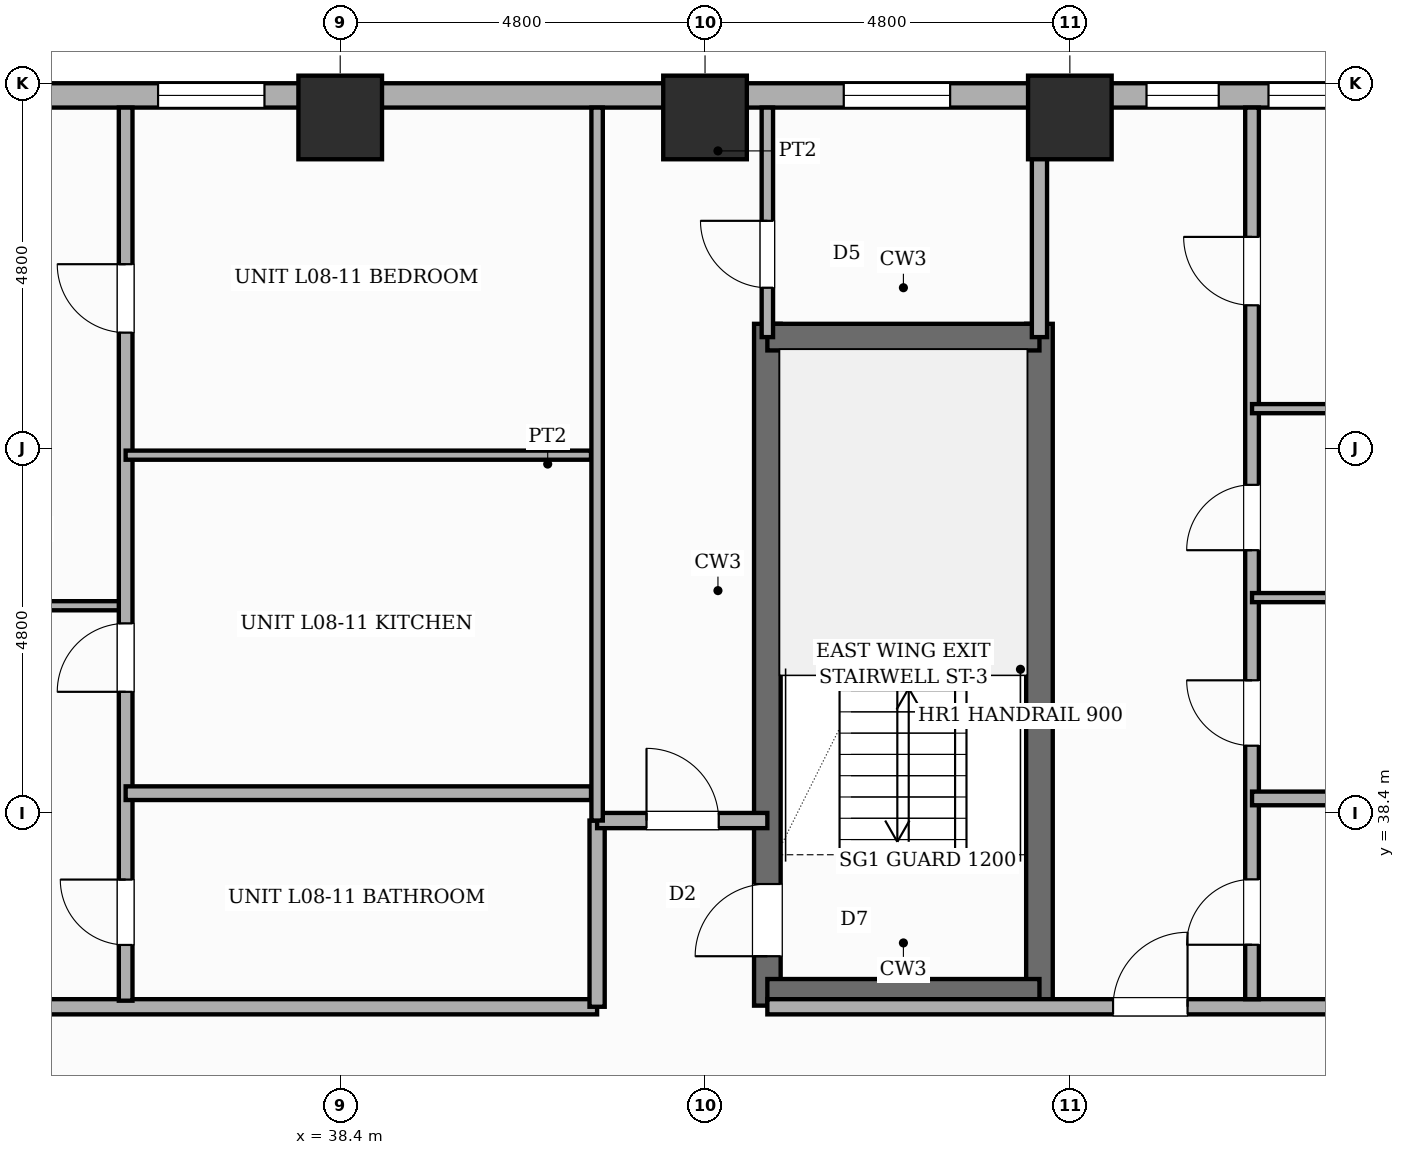
"""IFC4 building model, lengths in metres.
Left out: names, types, materials, properties, quantities, classifications, styles, units other than length and angle.
Written with IfcOpenShell. Run it as: python <this file> out.ifc"""

import sys

from ifc_helpers import new_model, si_unit, direction, frame, frame_2d, origin, origin_2d, place, context, subcontext, project, spatial, rectangle, extrude, element, fill, save


model = new_model("IFC4")
c1 = context("Model", 3, precision=1e-05, world=origin(), true_north=direction((0.0, 1.0)))
c2 = subcontext(c1, "Body", "Model", "MODEL_VIEW")
j1 = project(units=[si_unit("LENGTHUNIT", "METRE"), si_unit("PLANEANGLEUNIT", "RADIAN")], contexts=[c1])
p1 = place(None, origin())
s1 = spatial("IfcSite", under=j1, at=p1, CompositionType="ELEMENT")
p2 = place(p1, origin())
s2 = spatial("IfcBuilding", under=s1, at=p2, CompositionType="ELEMENT")
p3 = place(p2, frame((0.0, 0.0, 35.8)))
s3 = spatial("IfcBuildingStorey", under=s2, at=p3, CompositionType="ELEMENT", Elevation=35.8)
p4 = place(p3, frame((44.02, 35.865, 0.0), z_axis=(0.0, 0.0, 1.0), x_axis=(0.0, 1.0, 0.0)))
e1 = element("IfcWall", 1, at=p4, inside=s3, PredefinedType="SHEAR", context=c2, shape_type="SweptSolid", body=[
    extrude(rectangle(XDim=8.97, YDim=0.35, at=frame_2d((4.485, 0.0))), origin(), (0.0, 0.0, 1.0), 3.6),
])
p5 = place(p4, frame((0.65, 0.0, 0.0)))
e2 = element("IfcOpeningElement", 2, at=p5, cuts=e1, PredefinedType="OPENING", context=c2, shape_type="SweptSolid", body=[
    extrude(rectangle(XDim=0.95, YDim=2.1, at=frame_2d((0.475, 1.05))), frame((0.0, 0.185, 0.0), z_axis=(0.0, -1.0, 0.0), x_axis=(1.0, 0.0, 0.0)), (0.0, 0.0, 1.0), 0.37),
])
p6 = place(p3, frame((47.6, 35.865, 0.0), z_axis=(0.0, 0.0, 1.0), x_axis=(0.0, 1.0, 0.0)))
e3 = element("IfcWall", 3, at=p6, inside=s3, PredefinedType="SHEAR", context=c2, shape_type="SweptSolid", body=[
    extrude(rectangle(XDim=8.97, YDim=0.35, at=frame_2d((4.485, 0.0))), origin(), (0.0, 0.0, 1.0), 3.6),
])
for number, where, z_axis, x_axis in (
    (4, (44.02, 36.04, 0.0), (0.0, 0.0, 1.0), (1.0, 0.0, 0.0)),
    (5, (44.02, 44.66, 0.0), (0.0, 0.0, 1.0), (1.0, 0.0, 0.0)),
):
    element("IfcWall", number, at=place(p3, frame(where, z_axis=z_axis, x_axis=x_axis)), inside=s3, PredefinedType="SHEAR", context=c2, shape_type="SweptSolid", body=[
        extrude(rectangle(XDim=3.58, YDim=0.35, at=frame_2d((1.79, 0.0))), origin(), (0.0, 0.0, 1.0), 3.6),
    ])
for number, where, z_axis, x_axis in (
    (6, (38.4, 47.55, 0.0), (0.0, 0.0, 1.0), (1.0, 0.0, 0.0)),
    (7, (43.2, 47.55, 0.0), (0.0, 0.0, 1.0), (1.0, 0.0, 0.0)),
    (8, (48.0, 47.55, 0.0), (0.0, 0.0, 1.0), (1.0, 0.0, 0.0)),
):
    element("IfcColumn", number, at=place(p3, frame(where, z_axis=z_axis, x_axis=x_axis)), inside=s3, PredefinedType="COLUMN", context=c2, shape_type="SweptSolid", body=[
        extrude(rectangle(XDim=1.1, YDim=1.1, at=origin_2d()), origin(), (0.0, 0.0, 1.0), 3.6),
    ])
p7 = place(p3, frame((7.2, 47.84, 0.0), z_axis=(0.0, 0.0, 1.0), x_axis=(1.0, 0.0, 0.0)))
e9 = element("IfcWall", 9, at=p7, inside=s3, PredefinedType="STANDARD", context=c2, shape_type="SweptSolid", body=[
    extrude(rectangle(XDim=48.0, YDim=0.32, at=frame_2d((24.0, 0.0))), origin(), (0.0, 0.0, 1.0), 2.53),
])
p8 = place(p7, frame((28.803, 0.0, 0.65)))
e10 = element("IfcOpeningElement", 10, at=p8, cuts=e9, PredefinedType="OPENING", context=c2, shape_type="SweptSolid", body=[
    extrude(rectangle(XDim=1.4, YDim=1.1, at=frame_2d((0.7, 0.55))), frame((0.0, 0.17, 0.0), z_axis=(0.0, -1.0, 0.0), x_axis=(1.0, 0.0, 0.0)), (0.0, 0.0, 1.0), 0.34),
])
p9 = place(p7, frame((43.414, 0.0, 0.45)))
e11 = element("IfcOpeningElement", 11, at=p9, cuts=e9, PredefinedType="OPENING", context=c2, shape_type="SweptSolid", body=[
    extrude(rectangle(XDim=0.95, YDim=1.8, at=frame_2d((0.475, 0.9))), frame((0.0, 0.17, 0.0), z_axis=(0.0, -1.0, 0.0), x_axis=(1.0, 0.0, 0.0)), (0.0, 0.0, 1.0), 0.34),
])
p10 = place(p7, frame((18.74, 0.0, 0.45)))
e12 = element("IfcOpeningElement", 12, at=p10, cuts=e9, PredefinedType="OPENING", context=c2, shape_type="SweptSolid", body=[
    extrude(rectangle(XDim=0.95, YDim=1.8, at=frame_2d((0.475, 0.9))), frame((0.0, 0.17, 0.0), z_axis=(0.0, -1.0, 0.0), x_axis=(1.0, 0.0, 0.0)), (0.0, 0.0, 1.0), 0.34),
])
p11 = place(p7, frame((37.825, 0.0, 0.65)))
e13 = element("IfcOpeningElement", 13, at=p11, cuts=e9, PredefinedType="OPENING", context=c2, shape_type="SweptSolid", body=[
    extrude(rectangle(XDim=1.4, YDim=1.1, at=frame_2d((0.7, 0.55))), frame((0.0, 0.17, 0.0), z_axis=(0.0, -1.0, 0.0), x_axis=(1.0, 0.0, 0.0)), (0.0, 0.0, 1.0), 0.34),
])
p12 = place(p7, frame((0.47, 0.0, 0.45)))
e14 = element("IfcOpeningElement", 14, at=p12, cuts=e9, PredefinedType="OPENING", context=c2, shape_type="SweptSolid", body=[
    extrude(rectangle(XDim=0.95, YDim=1.8, at=frame_2d((0.475, 0.9))), frame((0.0, 0.17, 0.0), z_axis=(0.0, -1.0, 0.0), x_axis=(1.0, 0.0, 0.0)), (0.0, 0.0, 1.0), 0.34),
])
p13 = place(p7, frame((5.265, 0.0, 0.45)))
e15 = element("IfcOpeningElement", 15, at=p13, cuts=e9, PredefinedType="OPENING", context=c2, shape_type="SweptSolid", body=[
    extrude(rectangle(XDim=0.95, YDim=1.8, at=frame_2d((0.475, 0.9))), frame((0.0, 0.17, 0.0), z_axis=(0.0, -1.0, 0.0), x_axis=(1.0, 0.0, 0.0)), (0.0, 0.0, 1.0), 0.34),
])
p14 = place(p7, frame((23.43, 0.0, 0.65)))
e16 = element("IfcOpeningElement", 16, at=p14, cuts=e9, PredefinedType="OPENING", context=c2, shape_type="SweptSolid", body=[
    extrude(rectangle(XDim=1.4, YDim=1.1, at=frame_2d((0.7, 0.55))), frame((0.0, 0.17, 0.0), z_axis=(0.0, -1.0, 0.0), x_axis=(1.0, 0.0, 0.0)), (0.0, 0.0, 1.0), 0.34),
])
p15 = place(p7, frame((41.809, 0.0, 0.45)))
e17 = element("IfcOpeningElement", 17, at=p15, cuts=e9, PredefinedType="OPENING", context=c2, shape_type="SweptSolid", body=[
    extrude(rectangle(XDim=0.95, YDim=1.8, at=frame_2d((0.475, 0.9))), frame((0.0, 0.17, 0.0), z_axis=(0.0, -1.0, 0.0), x_axis=(1.0, 0.0, 0.0)), (0.0, 0.0, 1.0), 0.34),
])
p16 = place(p3, frame((27.35, 35.85, 0.0), z_axis=(0.0, 0.0, 1.0), x_axis=(1.0, 0.0, 0.0)))
e18 = element("IfcWall", 18, at=p16, inside=s3, PredefinedType="PARTITIONING", context=c2, shape_type="SweptSolid", body=[
    extrude(rectangle(XDim=14.43, YDim=0.2, at=frame_2d((7.215, 0.0))), origin(), (0.0, 0.0, 1.0), 3.35),
])
p17 = place(p16, frame((4.803, 0.0, 0.0)))
e19 = element("IfcOpeningElement", 19, at=p17, cuts=e18, PredefinedType="OPENING", context=c2, shape_type="SweptSolid", body=[
    extrude(rectangle(XDim=0.98, YDim=2.18, at=frame_2d((0.49, 1.09))), frame((0.0, 0.11, 0.0), z_axis=(0.0, -1.0, 0.0), x_axis=(1.0, 0.0, 0.0)), (0.0, 0.0, 1.0), 0.22),
])
p18 = place(p3, frame((44.02, 35.85, 0.0), z_axis=(0.0, 0.0, 1.0), x_axis=(1.0, 0.0, 0.0)))
e20 = element("IfcWall", 20, at=p18, inside=s3, PredefinedType="PARTITIONING", context=c2, shape_type="SweptSolid", body=[
    extrude(rectangle(XDim=13.26, YDim=0.2, at=frame_2d((6.63, 0.0))), origin(), (0.0, 0.0, 1.0), 3.35),
])
p19 = place(p18, frame((4.549, 0.0, 0.0)))
e21 = element("IfcOpeningElement", 21, at=p19, cuts=e20, PredefinedType="OPENING", context=c2, shape_type="SweptSolid", body=[
    extrude(rectangle(XDim=0.98, YDim=2.18, at=frame_2d((0.49, 1.09))), frame((0.0, 0.11, 0.0), z_axis=(0.0, -1.0, 0.0), x_axis=(1.0, 0.0, 0.0)), (0.0, 0.0, 1.0), 0.22),
])
p20 = place(p3, frame((41.78, 35.85, 0.0), z_axis=(0.0, 0.0, 1.0), x_axis=(0.0, 1.0, 0.0)))
e22 = element("IfcWall", 22, at=p20, inside=s3, PredefinedType="PARTITIONING", context=c2, shape_type="SweptSolid", body=[
    extrude(rectangle(XDim=2.45, YDim=0.2, at=frame_2d((1.225, 0.0))), origin(), (0.0, 0.0, 1.0), 3.35),
])
p21 = place(p3, frame((41.78, 38.3, 0.0), z_axis=(0.0, 0.0, 1.0), x_axis=(1.0, 0.0, 0.0)))
e23 = element("IfcWall", 23, at=p21, inside=s3, PredefinedType="PARTITIONING", context=c2, shape_type="SweptSolid", body=[
    extrude(rectangle(XDim=2.24, YDim=0.2, at=frame_2d((1.12, 0.0))), origin(), (0.0, 0.0, 1.0), 3.35),
])
p22 = place(p21, frame((0.65, 0.0, 0.0)))
e24 = element("IfcOpeningElement", 24, at=p22, cuts=e23, PredefinedType="OPENING", context=c2, shape_type="SweptSolid", body=[
    extrude(rectangle(XDim=0.95, YDim=2.15, at=frame_2d((0.475, 1.075))), frame((0.0, 0.11, 0.0), z_axis=(0.0, -1.0, 0.0), x_axis=(1.0, 0.0, 0.0)), (0.0, 0.0, 1.0), 0.22),
])
p23 = place(p3, frame((29.63, 41.126, 0.0), z_axis=(0.0, 0.0, 1.0), x_axis=(1.0, 0.0, 0.0)))
e25 = element("IfcWall", 25, at=p23, inside=s3, PredefinedType="PARTITIONING", context=c2, shape_type="SweptSolid", body=[
    extrude(rectangle(XDim=5.947, YDim=0.12, at=frame_2d((2.974, 0.0))), origin(), (0.0, 0.0, 1.0), 3.35),
])
p24 = place(p23, frame((2.235, 0.0, 0.0)))
e26 = element("IfcOpeningElement", 26, at=p24, cuts=e25, PredefinedType="OPENING", context=c2, shape_type="SweptSolid", body=[
    extrude(rectangle(XDim=0.9, YDim=2.15, at=frame_2d((0.45, 1.075))), frame((0.0, 0.07, 0.0), z_axis=(0.0, -1.0, 0.0), x_axis=(1.0, 0.0, 0.0)), (0.0, 0.0, 1.0), 0.14),
])
p25 = place(p3, frame((35.577, 35.93, 0.0), z_axis=(0.0, 0.0, 1.0), x_axis=(0.0, 1.0, 0.0)))
e27 = element("IfcWall", 27, at=p25, inside=s3, PredefinedType="PLUMBINGWALL", context=c2, shape_type="SweptSolid", body=[
    extrude(rectangle(XDim=11.75, YDim=0.18, at=frame_2d((5.875, 0.0))), origin(), (0.0, 0.0, 1.0), 3.35),
])
p26 = place(p25, frame((0.733, 0.0, 0.0)))
e28 = element("IfcOpeningElement", 28, at=p26, cuts=e27, PredefinedType="OPENING", context=c2, shape_type="SweptSolid", body=[
    extrude(rectangle(XDim=0.86, YDim=2.1, at=frame_2d((0.43, 1.05))), frame((0.0, 0.1, 0.0), z_axis=(0.0, -1.0, 0.0), x_axis=(1.0, 0.0, 0.0)), (0.0, 0.0, 1.0), 0.2),
])
p27 = place(p25, frame((4.064, 0.0, 0.0)))
e29 = element("IfcOpeningElement", 29, at=p27, cuts=e27, PredefinedType="OPENING", context=c2, shape_type="SweptSolid", body=[
    extrude(rectangle(XDim=0.9, YDim=2.15, at=frame_2d((0.45, 1.075))), frame((0.0, 0.1, 0.0), z_axis=(0.0, -1.0, 0.0), x_axis=(1.0, 0.0, 0.0)), (0.0, 0.0, 1.0), 0.2),
])
p28 = place(p25, frame((8.789, 0.0, 0.0)))
e30 = element("IfcOpeningElement", 30, at=p28, cuts=e27, PredefinedType="OPENING", context=c2, shape_type="SweptSolid", body=[
    extrude(rectangle(XDim=0.9, YDim=2.15, at=frame_2d((0.45, 1.075))), frame((0.0, 0.1, 0.0), z_axis=(0.0, -1.0, 0.0), x_axis=(1.0, 0.0, 0.0)), (0.0, 0.0, 1.0), 0.2),
])
p29 = place(p3, frame((35.577, 38.66, 0.0), z_axis=(0.0, 0.0, 1.0), x_axis=(1.0, 0.0, 0.0)))
e31 = element("IfcWall", 31, at=p29, inside=s3, PredefinedType="PLUMBINGWALL", context=c2, shape_type="SweptSolid", body=[
    extrude(rectangle(XDim=6.123, YDim=0.18, at=frame_2d((3.062, 0.0))), origin(), (0.0, 0.0, 1.0), 3.35),
])
p30 = place(p3, frame((35.577, 43.107, 0.0), z_axis=(0.0, 0.0, 1.0), x_axis=(1.0, 0.0, 0.0)))
e32 = element("IfcWall", 32, at=p30, inside=s3, PredefinedType="PARTITIONING", context=c2, shape_type="SweptSolid", body=[
    extrude(rectangle(XDim=6.123, YDim=0.12, at=frame_2d((3.062, 0.0))), origin(), (0.0, 0.0, 1.0), 3.35),
])
p31 = place(p3, frame((41.78, 38.3, 0.0), z_axis=(0.0, 0.0, 1.0), x_axis=(0.0, 1.0, 0.0)))
e33 = element("IfcWall", 33, at=p31, inside=s3, PredefinedType="PARTITIONING", context=c2, shape_type="SweptSolid", body=[
    extrude(rectangle(XDim=9.38, YDim=0.15, at=frame_2d((4.69, 0.0))), origin(), (0.0, 0.0, 1.0), 3.35),
])
p32 = place(p3, frame((50.397, 35.95, 0.0), z_axis=(0.0, 0.0, 1.0), x_axis=(0.0, 1.0, 0.0)))
e34 = element("IfcWall", 34, at=p32, inside=s3, PredefinedType="PLUMBINGWALL", context=c2, shape_type="SweptSolid", body=[
    extrude(rectangle(XDim=11.73, YDim=0.18, at=frame_2d((5.865, 0.0))), origin(), (0.0, 0.0, 1.0), 3.35),
])
p33 = place(p32, frame((0.716, 0.0, 0.0)))
e35 = element("IfcOpeningElement", 35, at=p33, cuts=e34, PredefinedType="OPENING", context=c2, shape_type="SweptSolid", body=[
    extrude(rectangle(XDim=0.86, YDim=2.1, at=frame_2d((0.43, 1.05))), frame((0.0, 0.1, 0.0), z_axis=(0.0, -1.0, 0.0), x_axis=(1.0, 0.0, 0.0)), (0.0, 0.0, 1.0), 0.2),
])
p34 = place(p32, frame((3.335, 0.0, 0.0)))
e36 = element("IfcOpeningElement", 36, at=p34, cuts=e34, PredefinedType="OPENING", context=c2, shape_type="SweptSolid", body=[
    extrude(rectangle(XDim=0.86, YDim=2.1, at=frame_2d((0.43, 1.05))), frame((0.0, 0.1, 0.0), z_axis=(0.0, -1.0, 0.0), x_axis=(1.0, 0.0, 0.0)), (0.0, 0.0, 1.0), 0.2),
])
p35 = place(p32, frame((5.907, 0.0, 0.0)))
e37 = element("IfcOpeningElement", 37, at=p35, cuts=e34, PredefinedType="OPENING", context=c2, shape_type="SweptSolid", body=[
    extrude(rectangle(XDim=0.86, YDim=2.1, at=frame_2d((0.43, 1.05))), frame((0.0, 0.1, 0.0), z_axis=(0.0, -1.0, 0.0), x_axis=(1.0, 0.0, 0.0)), (0.0, 0.0, 1.0), 0.2),
])
p36 = place(p32, frame((9.128, 0.0, 0.0)))
e38 = element("IfcOpeningElement", 38, at=p36, cuts=e34, PredefinedType="OPENING", context=c2, shape_type="SweptSolid", body=[
    extrude(rectangle(XDim=0.9, YDim=2.15, at=frame_2d((0.45, 1.075))), frame((0.0, 0.1, 0.0), z_axis=(0.0, -1.0, 0.0), x_axis=(1.0, 0.0, 0.0)), (0.0, 0.0, 1.0), 0.2),
])
p37 = place(p3, frame((50.397, 38.591, 0.0), z_axis=(0.0, 0.0, 1.0), x_axis=(1.0, 0.0, 0.0)))
e39 = element("IfcWall", 39, at=p37, inside=s3, PredefinedType="PLUMBINGWALL", context=c2, shape_type="SweptSolid", body=[
    extrude(rectangle(XDim=6.883, YDim=0.18, at=frame_2d((3.441, 0.0))), origin(), (0.0, 0.0, 1.0), 2.53),
])
for number, where, z_axis, x_axis in (
    (40, (50.397, 41.233, 0.0), (0.0, 0.0, 1.0), (1.0, 0.0, 0.0)),
    (41, (50.397, 43.719, 0.0), (0.0, 0.0, 1.0), (1.0, 0.0, 0.0)),
):
    element("IfcWall", number, at=place(p3, frame(where, z_axis=z_axis, x_axis=x_axis)), inside=s3, PredefinedType="PARTITIONING", context=c2, shape_type="SweptSolid", body=[
        extrude(rectangle(XDim=6.883, YDim=0.12, at=frame_2d((3.441, 0.0))), origin(), (0.0, 0.0, 1.0), 3.35),
    ])
p38 = place(p3, frame((44.02, 44.66, 0.0), z_axis=(0.0, 0.0, 1.0), x_axis=(0.0, 1.0, 0.0)))
e42 = element("IfcWall", 42, at=p38, inside=s3, PredefinedType="PARTITIONING", context=c2, shape_type="SweptSolid", body=[
    extrude(rectangle(XDim=3.02, YDim=0.15, at=frame_2d((1.51, 0.0))), origin(), (0.0, 0.0, 1.0), 3.35),
])
p39 = place(p38, frame((0.65, 0.0, 0.0)))
e43 = element("IfcOpeningElement", 43, at=p39, cuts=e42, PredefinedType="OPENING", context=c2, shape_type="SweptSolid", body=[
    extrude(rectangle(XDim=0.88, YDim=2.1, at=frame_2d((0.44, 1.05))), frame((0.0, 0.085, 0.0), z_axis=(0.0, -1.0, 0.0), x_axis=(1.0, 0.0, 0.0)), (0.0, 0.0, 1.0), 0.17),
])
p40 = place(p3, frame((47.6, 44.66, 0.0), z_axis=(0.0, 0.0, 1.0), x_axis=(0.0, 1.0, 0.0)))
e44 = element("IfcWall", 44, at=p40, inside=s3, PredefinedType="SOLIDWALL", context=c2, shape_type="SweptSolid", body=[
    extrude(rectangle(XDim=3.02, YDim=0.2, at=frame_2d((1.51, 0.0))), origin(), (0.0, 0.0, 1.0), 3.35),
])
p41 = place(p8, origin())
e45 = element("IfcWindow", 45, at=p41, inside=s3, PartitioningType="SINGLE_PANEL", PredefinedType="WINDOW", context=c2, shape_type="SweptSolid", body=[
    extrude(rectangle(XDim=1.4, YDim=1.1, at=frame_2d((0.7, 0.55))), frame((0.0, 0.03, 0.0), z_axis=(0.0, -1.0, 0.0), x_axis=(1.0, 0.0, 0.0)), (0.0, 0.0, 1.0), 0.06),
])
fill(e10, e45)
p42 = place(p9, origin())
e46 = element("IfcWindow", 46, at=p42, inside=s3, PartitioningType="SINGLE_PANEL", PredefinedType="WINDOW", context=c2, shape_type="SweptSolid", body=[
    extrude(rectangle(XDim=0.95, YDim=1.8, at=frame_2d((0.475, 0.9))), frame((0.0, 0.03, 0.0), z_axis=(0.0, -1.0, 0.0), x_axis=(1.0, 0.0, 0.0)), (0.0, 0.0, 1.0), 0.06),
])
fill(e11, e46)
p43 = place(p11, origin())
e47 = element("IfcWindow", 47, at=p43, inside=s3, PartitioningType="SINGLE_PANEL", PredefinedType="WINDOW", context=c2, shape_type="SweptSolid", body=[
    extrude(rectangle(XDim=1.4, YDim=1.1, at=frame_2d((0.7, 0.55))), frame((0.0, 0.03, 0.0), z_axis=(0.0, -1.0, 0.0), x_axis=(1.0, 0.0, 0.0)), (0.0, 0.0, 1.0), 0.06),
])
fill(e13, e47)
p44 = place(p15, origin())
e48 = element("IfcWindow", 48, at=p44, inside=s3, PartitioningType="SINGLE_PANEL", PredefinedType="WINDOW", context=c2, shape_type="SweptSolid", body=[
    extrude(rectangle(XDim=0.95, YDim=1.8, at=frame_2d((0.475, 0.9))), frame((0.0, 0.03, 0.0), z_axis=(0.0, -1.0, 0.0), x_axis=(1.0, 0.0, 0.0)), (0.0, 0.0, 1.0), 0.06),
])
fill(e17, e48)
p45 = place(p5, origin())
e49 = element("IfcDoor", 49, at=p45, inside=s3, OperationType="SINGLE_SWING_LEFT", PredefinedType="DOOR", context=c2, shape_type="SweptSolid", body=[
    extrude(rectangle(XDim=0.95, YDim=2.1, at=frame_2d((0.475, 1.05))), frame((0.0, 0.025, 0.0), z_axis=(0.0, -1.0, 0.0), x_axis=(1.0, 0.0, 0.0)), (0.0, 0.0, 1.0), 0.05),
])
fill(e2, e49)
p46 = place(p26, origin())
e50 = element("IfcDoor", 50, at=p46, inside=s3, OperationType="SINGLE_SWING_RIGHT", PredefinedType="DOOR", context=c2, shape_type="SweptSolid", body=[
    extrude(rectangle(XDim=0.86, YDim=2.1, at=frame_2d((0.43, 1.05))), frame((0.0, 0.025, 0.0), z_axis=(0.0, -1.0, 0.0), x_axis=(1.0, 0.0, 0.0)), (0.0, 0.0, 1.0), 0.05),
])
fill(e28, e50)
p47 = place(p27, origin())
e51 = element("IfcDoor", 51, at=p47, inside=s3, OperationType="SINGLE_SWING_LEFT", PredefinedType="DOOR", context=c2, shape_type="SweptSolid", body=[
    extrude(rectangle(XDim=0.9, YDim=2.15, at=frame_2d((0.45, 1.075))), frame((0.0, 0.025, 0.0), z_axis=(0.0, -1.0, 0.0), x_axis=(1.0, 0.0, 0.0)), (0.0, 0.0, 1.0), 0.05),
])
fill(e29, e51)
p48 = place(p28, origin())
e52 = element("IfcDoor", 52, at=p48, inside=s3, OperationType="SINGLE_SWING_RIGHT", PredefinedType="DOOR", context=c2, shape_type="SweptSolid", body=[
    extrude(rectangle(XDim=0.9, YDim=2.15, at=frame_2d((0.45, 1.075))), frame((0.0, 0.025, 0.0), z_axis=(0.0, -1.0, 0.0), x_axis=(1.0, 0.0, 0.0)), (0.0, 0.0, 1.0), 0.05),
])
fill(e30, e52)
p49 = place(p22, origin())
e53 = element("IfcDoor", 53, at=p49, inside=s3, OperationType="SINGLE_SWING_LEFT", PredefinedType="DOOR", context=c2, shape_type="SweptSolid", body=[
    extrude(rectangle(XDim=0.95, YDim=2.15, at=frame_2d((0.475, 1.075))), frame((0.0, 0.025, 0.0), z_axis=(0.0, -1.0, 0.0), x_axis=(1.0, 0.0, 0.0)), (0.0, 0.0, 1.0), 0.05),
])
fill(e24, e53)
p50 = place(p19, origin())
e54 = element("IfcDoor", 54, at=p50, inside=s3, OperationType="SINGLE_SWING_RIGHT", PredefinedType="DOOR", context=c2, shape_type="SweptSolid", body=[
    extrude(rectangle(XDim=0.98, YDim=2.18, at=frame_2d((0.49, 1.09))), frame((0.0, 0.025, 0.0), z_axis=(0.0, -1.0, 0.0), x_axis=(1.0, 0.0, 0.0)), (0.0, 0.0, 1.0), 0.05),
])
fill(e21, e54)
p51 = place(p33, origin())
e55 = element("IfcDoor", 55, at=p51, inside=s3, OperationType="SINGLE_SWING_LEFT", PredefinedType="DOOR", context=c2, shape_type="SweptSolid", body=[
    extrude(rectangle(XDim=0.86, YDim=2.1, at=frame_2d((0.43, 1.05))), frame((0.0, 0.025, 0.0), z_axis=(0.0, -1.0, 0.0), x_axis=(1.0, 0.0, 0.0)), (0.0, 0.0, 1.0), 0.05),
])
fill(e35, e55)
p52 = place(p34, origin())
e56 = element("IfcDoor", 56, at=p52, inside=s3, OperationType="SINGLE_SWING_RIGHT", PredefinedType="DOOR", context=c2, shape_type="SweptSolid", body=[
    extrude(rectangle(XDim=0.86, YDim=2.1, at=frame_2d((0.43, 1.05))), frame((0.0, 0.025, 0.0), z_axis=(0.0, -1.0, 0.0), x_axis=(1.0, 0.0, 0.0)), (0.0, 0.0, 1.0), 0.05),
])
fill(e36, e56)
p53 = place(p35, origin())
e57 = element("IfcDoor", 57, at=p53, inside=s3, OperationType="SINGLE_SWING_LEFT", PredefinedType="DOOR", context=c2, shape_type="SweptSolid", body=[
    extrude(rectangle(XDim=0.86, YDim=2.1, at=frame_2d((0.43, 1.05))), frame((0.0, 0.025, 0.0), z_axis=(0.0, -1.0, 0.0), x_axis=(1.0, 0.0, 0.0)), (0.0, 0.0, 1.0), 0.05),
])
fill(e37, e57)
p54 = place(p36, origin())
e58 = element("IfcDoor", 58, at=p54, inside=s3, OperationType="SINGLE_SWING_RIGHT", PredefinedType="DOOR", context=c2, shape_type="SweptSolid", body=[
    extrude(rectangle(XDim=0.9, YDim=2.15, at=frame_2d((0.45, 1.075))), frame((0.0, 0.025, 0.0), z_axis=(0.0, -1.0, 0.0), x_axis=(1.0, 0.0, 0.0)), (0.0, 0.0, 1.0), 0.05),
])
fill(e38, e58)
p55 = place(p39, origin())
e59 = element("IfcDoor", 59, at=p55, inside=s3, OperationType="SINGLE_SWING_RIGHT", PredefinedType="DOOR", context=c2, shape_type="SweptSolid", body=[
    extrude(rectangle(XDim=0.88, YDim=2.1, at=frame_2d((0.44, 1.05))), frame((0.0, 0.025, 0.0), z_axis=(0.0, -1.0, 0.0), x_axis=(1.0, 0.0, 0.0)), (0.0, 0.0, 1.0), 0.05),
])
fill(e43, e59)
save(model, sys.argv[1])
